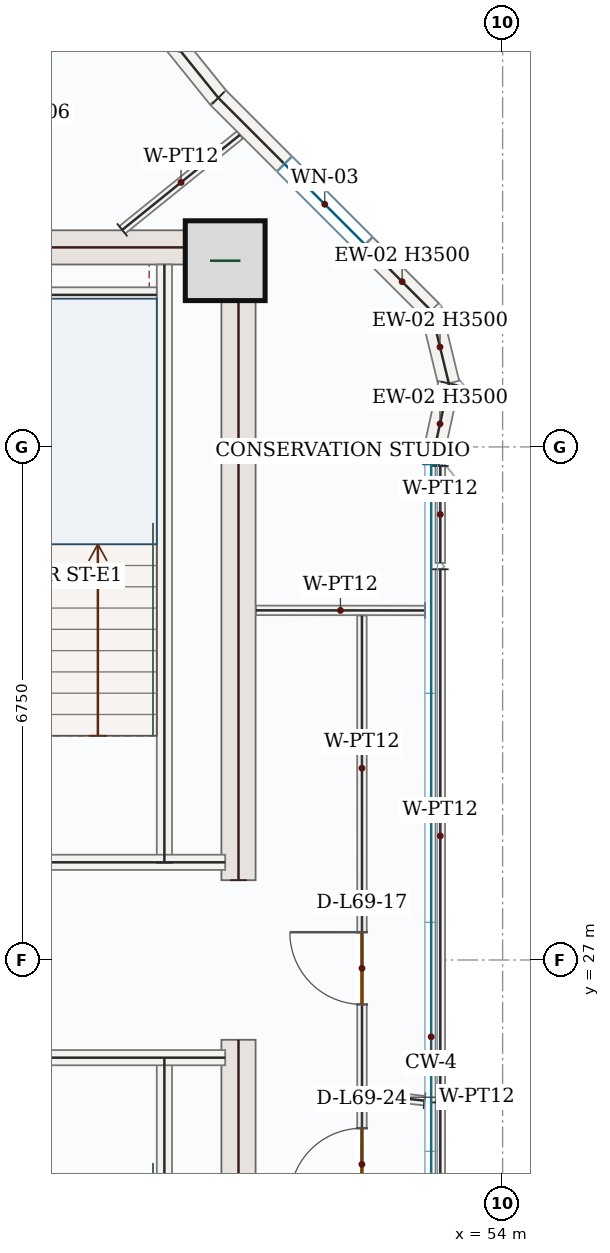
"""IFC4 building model, lengths in metres.
Left out: names, types, materials, properties, quantities, classifications, styles, units other than length and angle.
Written with IfcOpenShell. Run it as: python <this file> out.ifc"""

import sys

from ifc_helpers import new_model, si_unit, direction, frame, frame_2d, origin, origin_2d, place, context, subcontext, project, spatial, rectangle, extrude, source, transform, mapped, element, fill, save


model = new_model("IFC4")
c1 = context("Model", 3, precision=1e-05, world=origin(), true_north=direction((0.0, 1.0)))
c2 = subcontext(c1, "Body", "Model", "MODEL_VIEW")
j1 = project(units=[si_unit("LENGTHUNIT", "METRE"), si_unit("PLANEANGLEUNIT", "RADIAN")], contexts=[c1])
p1 = place(None, origin())
s1 = spatial("IfcSite", under=j1, at=p1, CompositionType="ELEMENT")
p2 = place(p1, origin())
s2 = spatial("IfcBuilding", under=s1, at=p2, CompositionType="ELEMENT")
p3 = place(p2, frame((0.0, 0.0, 287.85)))
s3 = spatial("IfcBuildingStorey", under=s2, at=p3, CompositionType="ELEMENT", Elevation=287.85)
m1 = source(origin(), c2, "Body", "SweptSolid", [
    extrude(rectangle(XDim=8.55, YDim=0.45, at=frame_2d((4.275, 0.0))), origin(), (0.0, 0.0, 1.0), 3.5),
])
for number, where, z_axis, x_axis in (
    (1, (50.525, 17.4, 0.0), (0.0, 0.0, 1.0), (0.0, 1.0, 0.0)),
    (2, (50.525, 28.05, 0.0), (0.0, 0.0, 1.0), (0.0, 1.0, 0.0)),
):
    element("IfcWall", number, at=place(p3, frame(where, z_axis=z_axis, x_axis=x_axis)), inside=s3, PredefinedType="SHEAR", context=c2, shape_type="MappedRepresentation", body=[
        mapped(m1, transform((0.0, 0.0, 0.0), x_axis=(1.0, 0.0, 0.0), y_axis=(0.0, 1.0, 0.0), z_axis=(0.0, 0.0, 1.0), scale=1.0)),
    ])
m2 = source(origin(), c2, "Body", "SweptSolid", [
    extrude(rectangle(XDim=7.1, YDim=0.45, at=frame_2d((3.55, 0.0))), origin(), (0.0, 0.0, 1.0), 3.5),
])
p4 = place(p3, frame((43.2, 36.375, 0.0), z_axis=(0.0, 0.0, 1.0), x_axis=(1.0, 0.0, 0.0)))
e3 = element("IfcWall", 3, at=p4, inside=s3, PredefinedType="SHEAR", context=c2, shape_type="MappedRepresentation", body=[
    mapped(m2, transform((0.0, 0.0, 0.0), x_axis=(1.0, 0.0, 0.0), y_axis=(0.0, 1.0, 0.0), z_axis=(0.0, 0.0, 1.0), scale=1.0)),
])
m3 = source(origin(), c2, "Body", "SweptSolid", [
    extrude(rectangle(XDim=1.05, YDim=1.05, at=origin_2d()), origin(), (0.0, 0.0, 1.0), 3.75),
])
p5 = place(p3, frame((50.35, 36.2, 0.0), z_axis=(0.0, 0.0, 1.0), x_axis=(1.0, 0.0, 0.0)))
e4 = element("IfcColumn", 4, at=p5, inside=s3, PredefinedType="COLUMN", context=c2, shape_type="MappedRepresentation", body=[
    mapped(m3, transform((0.0, 0.0, 0.0), x_axis=(1.0, 0.0, 0.0), y_axis=(0.0, 1.0, 0.0), z_axis=(0.0, 0.0, 1.0), scale=1.0)),
])
p6 = place(p3, frame((47.06, 42.305, 0.0), z_axis=(0.0, 0.0, 1.0), x_axis=(0.628225517447, -0.778031297075, 0.0)))
e5 = element("IfcWall", 5, at=p6, inside=s3, PredefinedType="SOLIDWALL", context=c2, shape_type="SweptSolid", body=[
    extrude(rectangle(XDim=5.093, YDim=0.28, at=frame_2d((2.546, 0.0))), origin(), (0.0, 0.0, 1.0), 3.5),
])
p7 = place(p6, frame((1.796, 0.0, 0.85)))
e6 = element("IfcOpeningElement", 6, at=p7, cuts=e5, PredefinedType="OPENING", context=c2, shape_type="SweptSolid", body=[
    extrude(rectangle(XDim=1.5, YDim=1.5, at=frame_2d((0.75, 0.75))), frame((0.0, 0.15, 0.0), z_axis=(0.0, -1.0, 0.0), x_axis=(1.0, 0.0, 0.0)), (0.0, 0.0, 1.0), 0.3),
])
p8 = place(p3, frame((50.26, 38.342, 0.0), z_axis=(0.0, 0.0, 1.0), x_axis=(0.707106781187, -0.707106781187, 0.0)))
e7 = element("IfcWall", 7, at=p8, inside=s3, PredefinedType="SOLIDWALL", context=c2, shape_type="SweptSolid", body=[
    extrude(rectangle(XDim=3.96, YDim=0.28, at=frame_2d((1.98, 0.0))), origin(), (0.0, 0.0, 1.0), 3.5),
])
p9 = place(p8, frame((1.23, 0.0, 0.85)))
e8 = element("IfcOpeningElement", 8, at=p9, cuts=e7, PredefinedType="OPENING", context=c2, shape_type="SweptSolid", body=[
    extrude(rectangle(XDim=1.5, YDim=1.5, at=frame_2d((0.75, 0.75))), frame((0.0, 0.15, 0.0), z_axis=(0.0, -1.0, 0.0), x_axis=(1.0, 0.0, 0.0)), (0.0, 0.0, 1.0), 0.3),
])
m4 = source(origin(), c2, "Body", "SweptSolid", [
    extrude(rectangle(XDim=0.983, YDim=0.28, at=frame_2d((0.492, 0.0))), origin(), (0.0, 0.0, 1.0), 3.5),
])
p10 = place(p3, frame((53.06, 35.542, 0.0), z_axis=(0.0, 0.0, 1.0), x_axis=(0.235870049888, -0.971784605541, 0.0)))
e9 = element("IfcWall", 9, at=p10, inside=s3, PredefinedType="SOLIDWALL", context=c2, shape_type="MappedRepresentation", body=[
    mapped(m4, transform((0.0, 0.0, 0.0), x_axis=(1.0, 0.0, 0.0), y_axis=(0.0, 1.0, 0.0), z_axis=(0.0, 0.0, 1.0), scale=1.0)),
])
m5 = source(origin(), c2, "Body", "SweptSolid", [
    extrude(rectangle(XDim=1.091, YDim=0.28, at=frame_2d((0.545, 0.0))), origin(), (0.0, 0.0, 1.0), 3.5),
])
p11 = place(p3, frame((53.292, 34.586, 0.0), z_axis=(0.0, 0.0, 1.0), x_axis=(-0.212661978508, -0.977125827566, 0.0)))
e10 = element("IfcWall", 10, at=p11, inside=s3, PredefinedType="SOLIDWALL", context=c2, shape_type="MappedRepresentation", body=[
    mapped(m5, transform((0.0, 0.0, 0.0), x_axis=(1.0, 0.0, 0.0), y_axis=(0.0, 1.0, 0.0), z_axis=(0.0, 0.0, 1.0), scale=1.0)),
])
m6 = source(origin(), c2, "Body", "SweptSolid", [
    extrude(rectangle(XDim=7.87, YDim=0.2, at=frame_2d((3.935, 0.0))), origin(), (0.0, 0.0, 1.0), 3.5),
])
for number, where, z_axis, x_axis in (
    (11, (49.55, 17.85, 0.0), (0.0, 0.0, 1.0), (0.0, 1.0, 0.0)),
    (12, (49.55, 28.28, 0.0), (0.0, 0.0, 1.0), (0.0, 1.0, 0.0)),
):
    element("IfcWall", number, at=place(p3, frame(where, z_axis=z_axis, x_axis=x_axis)), inside=s3, PredefinedType="SOLIDWALL", context=c2, shape_type="MappedRepresentation", body=[
        mapped(m6, transform((0.0, 0.0, 0.0), x_axis=(1.0, 0.0, 0.0), y_axis=(0.0, 1.0, 0.0), z_axis=(0.0, 0.0, 1.0), scale=1.0)),
    ])
m7 = source(origin(), c2, "Body", "SweptSolid", [
    extrude(rectangle(XDim=4.25, YDim=0.2, at=frame_2d((2.125, 0.0))), origin(), (0.0, 0.0, 1.0), 3.5),
])
for number, where, z_axis, x_axis in (
    (13, (46.1, 25.715, 0.0), (0.0, 0.0, 1.0), (1.0, 0.0, 0.0)),
    (14, (46.1, 28.285, 0.0), (0.0, 0.0, 1.0), (1.0, 0.0, 0.0)),
):
    element("IfcWall", number, at=place(p3, frame(where, z_axis=z_axis, x_axis=x_axis)), inside=s3, PredefinedType="SOLIDWALL", context=c2, shape_type="MappedRepresentation", body=[
        mapped(m7, transform((0.0, 0.0, 0.0), x_axis=(1.0, 0.0, 0.0), y_axis=(0.0, 1.0, 0.0), z_axis=(0.0, 0.0, 1.0), scale=1.0)),
    ])
m8 = source(origin(), c2, "Body", "SweptSolid", [
    extrude(rectangle(XDim=3.25, YDim=0.2, at=frame_2d((1.625, 0.0))), origin(), (0.0, 0.0, 1.0), 3.5),
])
p12 = place(p3, frame((46.2, 35.75, 0.0), z_axis=(0.0, 0.0, 1.0), x_axis=(1.0, 0.0, 0.0)))
e15 = element("IfcWall", 15, at=p12, inside=s3, PredefinedType="SOLIDWALL", context=c2, shape_type="MappedRepresentation", body=[
    mapped(m8, transform((0.0, 0.0, 0.0), x_axis=(1.0, 0.0, 0.0), y_axis=(0.0, 1.0, 0.0), z_axis=(0.0, 0.0, 1.0), scale=1.0)),
])
m9 = source(origin(), c2, "Body", "SweptSolid", [
    extrude(rectangle(XDim=2.223, YDim=0.125, at=frame_2d((1.111, 0.0))), origin(), (0.0, 0.0, 1.0), 3.5),
])
p13 = place(p3, frame((52.978, 31.598, 0.0), z_axis=(0.0, 0.0, 1.0), x_axis=(-0.999999704402, 0.000768892567, 0.0)))
e16 = element("IfcWall", 16, at=p13, inside=s3, PredefinedType="PARTITIONING", context=c2, shape_type="MappedRepresentation", body=[
    mapped(m9, transform((0.0, 0.0, 0.0), x_axis=(1.0, 0.0, 0.0), y_axis=(0.0, 1.0, 0.0), z_axis=(0.0, 0.0, 1.0), scale=1.0)),
])
m10 = source(origin(), c2, "Body", "SweptSolid", [
    extrude(rectangle(XDim=1.989, YDim=0.125, at=frame_2d((0.995, 0.0))), origin(), (0.0, 0.0, 1.0), 3.5),
])
p14 = place(p3, frame((48.995, 36.605, 0.0), z_axis=(0.0, 0.0, 1.0), x_axis=(0.778058853423, 0.628191388519, 0.0)))
e17 = element("IfcWall", 17, at=p14, inside=s3, PredefinedType="PARTITIONING", context=c2, shape_type="MappedRepresentation", body=[
    mapped(m10, transform((0.0, 0.0, 0.0), x_axis=(1.0, 0.0, 0.0), y_axis=(0.0, 1.0, 0.0), z_axis=(0.0, 0.0, 1.0), scale=1.0)),
])
m11 = source(origin(), c2, "Body", "SweptSolid", [
    extrude(rectangle(XDim=1.276, YDim=0.125, at=frame_2d((0.638, 0.0))), origin(), (0.0, 0.0, 1.0), 3.5),
])
p15 = place(p3, frame((53.18, 33.5, 0.0), z_axis=(0.0, 0.0, 1.0), x_axis=(0.0, -1.0, 0.0)))
e18 = element("IfcWall", 18, at=p15, inside=s3, PredefinedType="PARTITIONING", context=c2, shape_type="MappedRepresentation", body=[
    mapped(m11, transform((0.0, 0.0, 0.0), x_axis=(1.0, 0.0, 0.0), y_axis=(0.0, 1.0, 0.0), z_axis=(0.0, 0.0, 1.0), scale=1.0)),
])
m12 = source(origin(), c2, "Body", "SweptSolid", [
    extrude(rectangle(XDim=7.014, YDim=0.125, at=frame_2d((3.507, 0.0))), origin(), (0.0, 0.0, 1.0), 3.5),
])
p16 = place(p3, frame((53.18, 32.14, 0.0), z_axis=(0.0, 0.0, 1.0), x_axis=(0.0, -1.0, 0.0)))
e19 = element("IfcWall", 19, at=p16, inside=s3, PredefinedType="PARTITIONING", context=c2, shape_type="MappedRepresentation", body=[
    mapped(m12, transform((0.0, 0.0, 0.0), x_axis=(1.0, 0.0, 0.0), y_axis=(0.0, 1.0, 0.0), z_axis=(0.0, 0.0, 1.0), scale=1.0)),
])
m13 = source(origin(), c2, "Body", "SweptSolid", [
    extrude(rectangle(XDim=0.828, YDim=0.125, at=frame_2d((0.414, 0.0))), origin(), (0.0, 0.0, 1.0), 3.5),
])
p17 = place(p3, frame((52.972, 25.149, 0.0), z_axis=(0.0, 0.0, 1.0), x_axis=(-0.993862130166, 0.110625793652, 0.0)))
e20 = element("IfcWall", 20, at=p17, inside=s3, PredefinedType="PARTITIONING", context=c2, shape_type="MappedRepresentation", body=[
    mapped(m13, transform((0.0, 0.0, 0.0), x_axis=(1.0, 0.0, 0.0), y_axis=(0.0, 1.0, 0.0), z_axis=(0.0, 0.0, 1.0), scale=1.0)),
])
p18 = place(p3, frame((52.15, 25.24, 0.0), z_axis=(0.0, 0.0, 1.0), x_axis=(-0.000155231293, 0.999999987952, 0.0)))
e21 = element("IfcWall", 21, at=p18, inside=s3, PredefinedType="PARTITIONING", context=c2, shape_type="SweptSolid", body=[
    extrude(rectangle(XDim=6.291, YDim=0.125, at=frame_2d((3.146, 0.0))), origin(), (0.0, 0.0, 1.0), 3.5),
])
p19 = place(p18, frame((1.175, 0.0, 0.0)))
e22 = element("IfcOpeningElement", 22, at=p19, cuts=e21, PredefinedType="OPENING", context=c2, shape_type="SweptSolid", body=[
    extrude(rectangle(XDim=0.95, YDim=2.15, at=frame_2d((0.475, 1.075))), frame((0.0, 0.073, 0.0), z_axis=(0.0, -1.0, 0.0), x_axis=(1.0, 0.0, 0.0)), (0.0, 0.0, 1.0), 0.145),
])
p20 = place(p3, frame((52.146, 22.468, 0.0), z_axis=(0.0, 0.0, 1.0), x_axis=(0.001263765014, 0.999999201449, 0.0)))
e23 = element("IfcWall", 23, at=p20, inside=s3, PredefinedType="PARTITIONING", context=c2, shape_type="SweptSolid", body=[
    extrude(rectangle(XDim=2.705, YDim=0.125, at=frame_2d((1.352, 0.0))), origin(), (0.0, 0.0, 1.0), 3.5),
])
p21 = place(p20, frame((1.369, 0.0, 0.0)))
e24 = element("IfcOpeningElement", 24, at=p21, cuts=e23, PredefinedType="OPENING", context=c2, shape_type="SweptSolid", body=[
    extrude(rectangle(XDim=0.95, YDim=2.15, at=frame_2d((0.475, 1.075))), frame((0.0, 0.073, 0.0), z_axis=(0.0, -1.0, 0.0), x_axis=(1.0, 0.0, 0.0)), (0.0, 0.0, 1.0), 0.145),
])
m14 = source(origin(), c2, "Body", "SweptSolid", [
    extrude(rectangle(XDim=6.718, YDim=0.125, at=frame_2d((3.359, 0.0))), origin(), (0.0, 0.0, 1.0), 3.5),
])
p22 = place(p3, frame((53.18, 25.126, 0.0), z_axis=(0.0, 0.0, 1.0), x_axis=(0.0, -1.0, 0.0)))
e25 = element("IfcWall", 25, at=p22, inside=s3, PredefinedType="PARTITIONING", context=c2, shape_type="MappedRepresentation", body=[
    mapped(m14, transform((0.0, 0.0, 0.0), x_axis=(1.0, 0.0, 0.0), y_axis=(0.0, 1.0, 0.0), z_axis=(0.0, 0.0, 1.0), scale=1.0)),
])
m15 = source(origin(), c2, "Body", "SweptSolid", [
    extrude(rectangle(XDim=1.5, YDim=1.5, at=frame_2d((0.75, 0.75))), frame((0.0, 0.03, 0.0), z_axis=(0.0, -1.0, 0.0), x_axis=(1.0, 0.0, 0.0)), (0.0, 0.0, 1.0), 0.06),
])
p23 = place(p9, origin())
e26 = element("IfcWindow", 26, at=p23, inside=s3, PartitioningType="SINGLE_PANEL", PredefinedType="WINDOW", context=c2, shape_type="MappedRepresentation", body=[
    mapped(m15, transform((0.0, 0.0, 0.0), x_axis=(1.0, 0.0, 0.0), y_axis=(0.0, 1.0, 0.0), z_axis=(0.0, 0.0, 1.0), scale=1.0)),
])
fill(e8, e26)
m16 = source(origin(), c2, "Body", "SweptSolid", [
    extrude(rectangle(XDim=0.95, YDim=2.15, at=frame_2d((0.475, 1.075))), frame((0.0, 0.025, 0.0), z_axis=(0.0, -1.0, 0.0), x_axis=(1.0, 0.0, 0.0)), (0.0, 0.0, 1.0), 0.05),
])
p24 = place(p19, origin())
e27 = element("IfcDoor", 27, at=p24, inside=s3, OperationType="SINGLE_SWING_RIGHT", PredefinedType="DOOR", context=c2, shape_type="MappedRepresentation", body=[
    mapped(m16, transform((0.0, 0.0, 0.0), x_axis=(1.0, 0.0, 0.0), y_axis=(0.0, 1.0, 0.0), z_axis=(0.0, 0.0, 1.0), scale=1.0)),
])
fill(e22, e27)
p25 = place(p21, origin())
e28 = element("IfcDoor", 28, at=p25, inside=s3, OperationType="SINGLE_SWING_LEFT", PredefinedType="DOOR", context=c2, shape_type="MappedRepresentation", body=[
    mapped(m16, transform((0.0, 0.0, 0.0), x_axis=(1.0, 0.0, 0.0), y_axis=(0.0, 1.0, 0.0), z_axis=(0.0, 0.0, 1.0), scale=1.0)),
])
fill(e24, e28)
save(model, sys.argv[1])
